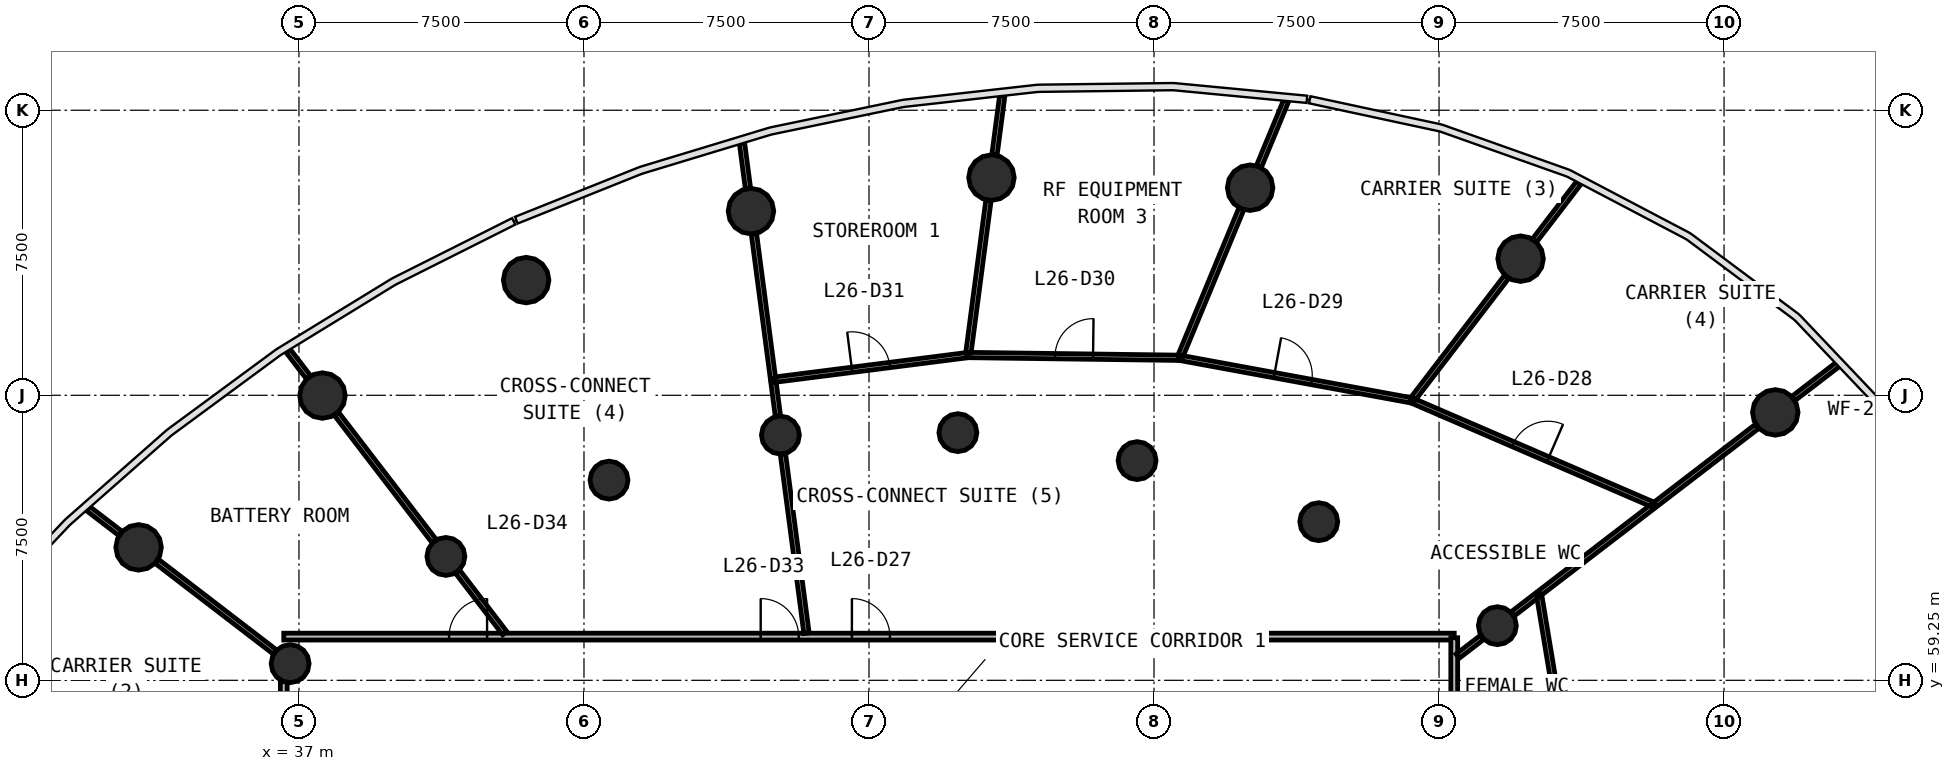
"""IFC4 building model, lengths in metres.
Left out: names, types, materials, properties, quantities, classifications, styles, units other than length and angle.
Written with IfcOpenShell. Run it as: python <this file> out.ifc"""

import sys

from ifc_helpers import new_model, si_unit, direction, frame, frame_2d, origin, origin_2d, place, context, subcontext, project, spatial, rectangle, circle, extrude, source, transform, mapped, element, fill, save


model = new_model("IFC4")
c1 = context("Model", 3, precision=1e-05, world=origin(), true_north=direction((0.0, 1.0)))
c2 = subcontext(c1, "Body", "Model", "MODEL_VIEW")
j1 = project(units=[si_unit("LENGTHUNIT", "METRE"), si_unit("PLANEANGLEUNIT", "RADIAN")], contexts=[c1])
p1 = place(None, origin())
s1 = spatial("IfcSite", under=j1, at=p1, CompositionType="ELEMENT")
p2 = place(p1, origin())
s2 = spatial("IfcBuilding", under=s1, at=p2, CompositionType="ELEMENT")
p3 = place(p2, frame((0.0, 0.0, 112.6)))
s3 = spatial("IfcBuildingStorey", under=s2, at=p3, CompositionType="ELEMENT", Elevation=112.6)
m1 = source(origin(), c2, "Body", "SweptSolid", [
    extrude(circle(Radius=0.6, at=origin_2d()), origin(), (0.0, 0.0, 1.0), 4.1),
])
for number, where, z_axis, x_axis in (
    (1, (75.848, 66.299, 0.0), (0.0, 0.0, 1.0), (1.0, 0.0, 0.0)),
    (2, (69.146, 70.345, 0.0), (0.0, 0.0, 1.0), (1.0, 0.0, 0.0)),
    (3, (62.029, 72.212, 0.0), (0.0, 0.0, 1.0), (1.0, 0.0, 0.0)),
    (4, (55.222, 72.477, 0.0), (0.0, 0.0, 1.0), (1.0, 0.0, 0.0)),
    (5, (48.894, 71.595, 0.0), (0.0, 0.0, 1.0), (1.0, 0.0, 0.0)),
    (6, (42.978, 69.781, 0.0), (0.0, 0.0, 1.0), (1.0, 0.0, 0.0)),
    (7, (37.618, 66.743, 0.0), (0.0, 0.0, 1.0), (1.0, 0.0, 0.0)),
    (8, (32.78, 62.748, 0.0), (0.0, 0.0, 1.0), (1.0, 0.0, 0.0)),
):
    element("IfcColumn", number, at=place(p3, frame(where, z_axis=z_axis, x_axis=x_axis)), inside=s3, PredefinedType="COLUMN", context=c2, shape_type="MappedRepresentation", body=[
        mapped(m1, transform((0.0, 0.0, 0.0), scale=1.0)),
    ])
m2 = source(origin(), c2, "Body", "SweptSolid", [
    extrude(circle(Radius=0.5, at=origin_2d()), origin(), (0.0, 0.0, 1.0), 4.1),
])
for number, where, z_axis, x_axis in (
    (9, (68.535, 60.688, 0.0), (0.0, 0.0, 1.0), (1.0, 0.0, 0.0)),
    (10, (63.835, 63.424, 0.0), (0.0, 0.0, 1.0), (1.0, 0.0, 0.0)),
    (11, (59.055, 65.031, 0.0), (0.0, 0.0, 1.0), (1.0, 0.0, 0.0)),
    (12, (54.339, 65.767, 0.0), (0.0, 0.0, 1.0), (1.0, 0.0, 0.0)),
    (13, (49.669, 65.703, 0.0), (0.0, 0.0, 1.0), (1.0, 0.0, 0.0)),
    (14, (45.158, 64.518, 0.0), (0.0, 0.0, 1.0), (1.0, 0.0, 0.0)),
    (15, (40.866, 62.51, 0.0), (0.0, 0.0, 1.0), (1.0, 0.0, 0.0)),
    (16, (36.768, 59.688, 0.0), (0.0, 0.0, 1.0), (1.0, 0.0, 0.0)),
):
    element("IfcColumn", number, at=place(p3, frame(where, z_axis=z_axis, x_axis=x_axis)), inside=s3, PredefinedType="COLUMN", context=c2, shape_type="MappedRepresentation", body=[
        mapped(m2, transform((0.0, 0.0, 0.0), scale=1.0)),
    ])
p4 = place(p3, frame((36.6, 60.4, 0.0), z_axis=(0.0, 0.0, 1.0), x_axis=(1.0, 0.0, 0.0)))
e17 = element("IfcWall", 17, at=p4, inside=s3, PredefinedType="PARTITIONING", context=c2, shape_type="SweptSolid", body=[
    extrude(rectangle(XDim=30.8, YDim=0.18, at=frame_2d((15.4, 0.0))), origin(), (0.0, 0.0, 1.0), 2.9),
])
p5 = place(p4, frame((14.95, 0.0, 0.0)))
e18 = element("IfcOpeningElement", 18, at=p5, cuts=e17, PredefinedType="OPENING", context=c2, shape_type="SweptSolid", body=[
    extrude(rectangle(XDim=1.0, YDim=2.1, at=frame_2d((0.5, 1.05))), frame((0.0, 0.1, 0.0), z_axis=(0.0, -1.0, 0.0), x_axis=(1.0, 0.0, 0.0)), (0.0, 0.0, 1.0), 0.2),
])
p6 = place(p4, frame((12.55, 0.0, 0.0)))
e19 = element("IfcOpeningElement", 19, at=p6, cuts=e17, PredefinedType="OPENING", context=c2, shape_type="SweptSolid", body=[
    extrude(rectangle(XDim=1.0, YDim=2.1, at=frame_2d((0.5, 1.05))), frame((0.0, 0.1, 0.0), z_axis=(0.0, -1.0, 0.0), x_axis=(1.0, 0.0, 0.0)), (0.0, 0.0, 1.0), 0.2),
])
p7 = place(p4, frame((4.35, 0.0, 0.0)))
e20 = element("IfcOpeningElement", 20, at=p7, cuts=e17, PredefinedType="OPENING", context=c2, shape_type="SweptSolid", body=[
    extrude(rectangle(XDim=1.0, YDim=2.1, at=frame_2d((0.5, 1.05))), frame((0.0, 0.1, 0.0), z_axis=(0.0, -1.0, 0.0), x_axis=(1.0, 0.0, 0.0)), (0.0, 0.0, 1.0), 0.2),
])
p8 = place(p3, frame((67.4, 60.37, 0.0), z_axis=(0.0, 0.0, 1.0), x_axis=(0.0, -1.0, 0.0)))
e21 = element("IfcWall", 21, at=p8, inside=s3, PredefinedType="PARTITIONING", context=c2, shape_type="SweptSolid", body=[
    extrude(rectangle(XDim=23.583, YDim=0.18, at=frame_2d((11.791, 0.0))), origin(), (0.0, 0.0, 1.0), 2.9),
])
p9 = place(p8, frame((9.232, 0.0, 0.0)))
e22 = element("IfcOpeningElement", 22, at=p9, cuts=e21, PredefinedType="OPENING", context=c2, shape_type="SweptSolid", body=[
    extrude(rectangle(XDim=0.9, YDim=2.1, at=frame_2d((0.45, 1.05))), frame((0.0, 0.1, 0.0), z_axis=(0.0, -1.0, 0.0), x_axis=(1.0, 0.0, 0.0)), (0.0, 0.0, 1.0), 0.2),
])
p10 = place(p8, frame((6.232, 0.0, 0.0)))
e23 = element("IfcOpeningElement", 23, at=p10, cuts=e21, PredefinedType="OPENING", context=c2, shape_type="SweptSolid", body=[
    extrude(rectangle(XDim=0.9, YDim=2.1, at=frame_2d((0.45, 1.05))), frame((0.0, 0.1, 0.0), z_axis=(0.0, -1.0, 0.0), x_axis=(1.0, 0.0, 0.0)), (0.0, 0.0, 1.0), 0.2),
])
p11 = place(p8, frame((3.032, 0.0, 0.0)))
e24 = element("IfcOpeningElement", 24, at=p11, cuts=e21, PredefinedType="OPENING", context=c2, shape_type="SweptSolid", body=[
    extrude(rectangle(XDim=0.9, YDim=2.1, at=frame_2d((0.45, 1.05))), frame((0.0, 0.1, 0.0), z_axis=(0.0, -1.0, 0.0), x_axis=(1.0, 0.0, 0.0)), (0.0, 0.0, 1.0), 0.2),
])
p12 = place(p8, frame((11.333, 0.0, 0.0)))
e25 = element("IfcOpeningElement", 25, at=p12, cuts=e21, PredefinedType="OPENING", context=c2, shape_type="SweptSolid", body=[
    extrude(rectangle(XDim=1.0, YDim=2.1, at=frame_2d((0.5, 1.05))), frame((0.0, 0.1, 0.0), z_axis=(0.0, -1.0, 0.0), x_axis=(1.0, 0.0, 0.0)), (0.0, 0.0, 1.0), 0.2),
])
p13 = place(p3, frame((36.6, 35.63, 0.0), z_axis=(0.0, 0.0, 1.0), x_axis=(0.0, 1.0, 0.0)))
e26 = element("IfcWall", 26, at=p13, inside=s3, PredefinedType="PARTITIONING", context=c2, shape_type="SweptSolid", body=[
    extrude(rectangle(XDim=23.583, YDim=0.18, at=frame_2d((11.791, 0.0))), origin(), (0.0, 0.0, 1.0), 2.9),
])
p14 = place(p13, frame((19.133, 0.0, 0.0)))
e27 = element("IfcOpeningElement", 27, at=p14, cuts=e26, PredefinedType="OPENING", context=c2, shape_type="SweptSolid", body=[
    extrude(rectangle(XDim=1.0, YDim=2.1, at=frame_2d((0.5, 1.05))), frame((0.0, 0.1, 0.0), z_axis=(0.0, -1.0, 0.0), x_axis=(1.0, 0.0, 0.0)), (0.0, 0.0, 1.0), 0.2),
])
p15 = place(p13, frame((11.333, 0.0, 0.0)))
e28 = element("IfcOpeningElement", 28, at=p15, cuts=e26, PredefinedType="OPENING", context=c2, shape_type="SweptSolid", body=[
    extrude(rectangle(XDim=1.0, YDim=2.1, at=frame_2d((0.5, 1.05))), frame((0.0, 0.1, 0.0), z_axis=(0.0, -1.0, 0.0), x_axis=(1.0, 0.0, 0.0)), (0.0, 0.0, 1.0), 0.2),
])
p16 = place(p3, frame((66.283, 66.614, 0.0), z_axis=(0.0, 0.0, 1.0), x_axis=(0.918121300146, -0.396299480467, 0.0)))
e29 = element("IfcWall", 29, at=p16, inside=s3, PredefinedType="PARTITIONING", context=c2, shape_type="SweptSolid", body=[
    extrude(rectangle(XDim=6.953, YDim=0.14, at=frame_2d((3.477, 0.0))), origin(), (0.0, 0.0, 1.0), 2.9),
])
p17 = place(p16, frame((2.903, 0.0, 0.0)))
e30 = element("IfcOpeningElement", 30, at=p17, cuts=e29, PredefinedType="OPENING", context=c2, shape_type="SweptSolid", body=[
    extrude(rectangle(XDim=1.0, YDim=2.1, at=frame_2d((0.5, 1.05))), frame((0.0, 0.08, 0.0), z_axis=(0.0, -1.0, 0.0), x_axis=(1.0, 0.0, 0.0)), (0.0, 0.0, 1.0), 0.16),
])
p18 = place(p3, frame((60.175, 67.736, 0.0), z_axis=(0.0, 0.0, 1.0), x_axis=(0.983532551925, -0.180731069007, 0.0)))
e31 = element("IfcWall", 31, at=p18, inside=s3, PredefinedType="PARTITIONING", context=c2, shape_type="SweptSolid", body=[
    extrude(rectangle(XDim=6.18, YDim=0.14, at=frame_2d((3.09, 0.0))), origin(), (0.0, 0.0, 1.0), 2.9),
])
p19 = place(p18, frame((2.53, 0.0, 0.0)))
e32 = element("IfcOpeningElement", 32, at=p19, cuts=e31, PredefinedType="OPENING", context=c2, shape_type="SweptSolid", body=[
    extrude(rectangle(XDim=1.0, YDim=2.1, at=frame_2d((0.5, 1.05))), frame((0.0, 0.08, 0.0), z_axis=(0.0, -1.0, 0.0), x_axis=(1.0, 0.0, 0.0)), (0.0, 0.0, 1.0), 0.16),
])
p20 = place(p3, frame((70.595, 55.702, 0.0), z_axis=(0.0, 0.0, 1.0), x_axis=(-0.163882608994, 0.986479847979, 0.0)))
e33 = element("IfcWall", 33, at=p20, inside=s3, PredefinedType="PARTITIONING", context=c2, shape_type="SweptSolid", body=[
    extrude(rectangle(XDim=5.904, YDim=0.14, at=frame_2d((2.952, 0.0))), origin(), (0.0, 0.0, 1.0), 2.9),
])
p21 = place(p3, frame((54.608, 67.809, 0.0), z_axis=(0.0, 0.0, 1.0), x_axis=(0.999914844667, -0.01305003501, 0.0)))
e34 = element("IfcWall", 34, at=p21, inside=s3, PredefinedType="PARTITIONING", context=c2, shape_type="SweptSolid", body=[
    extrude(rectangle(XDim=5.538, YDim=0.14, at=frame_2d((2.769, 0.0))), origin(), (0.0, 0.0, 1.0), 2.9),
])
p22 = place(p21, frame((2.288, 0.0, 0.0)))
e35 = element("IfcOpeningElement", 35, at=p22, cuts=e34, PredefinedType="OPENING", context=c2, shape_type="SweptSolid", body=[
    extrude(rectangle(XDim=1.0, YDim=2.1, at=frame_2d((0.5, 1.05))), frame((0.0, 0.08, 0.0), z_axis=(0.0, -1.0, 0.0), x_axis=(1.0, 0.0, 0.0)), (0.0, 0.0, 1.0), 0.16),
])
p23 = place(p3, frame((49.478, 67.156, 0.0), z_axis=(0.0, 0.0, 1.0), x_axis=(0.991978436008, 0.126407209031, 0.0)))
e36 = element("IfcWall", 36, at=p23, inside=s3, PredefinedType="PARTITIONING", context=c2, shape_type="SweptSolid", body=[
    extrude(rectangle(XDim=5.141, YDim=0.14, at=frame_2d((2.571, 0.0))), origin(), (0.0, 0.0, 1.0), 2.9),
])
p24 = place(p23, frame((2.091, 0.0, 0.0)))
e37 = element("IfcOpeningElement", 37, at=p24, cuts=e36, PredefinedType="OPENING", context=c2, shape_type="SweptSolid", body=[
    extrude(rectangle(XDim=1.0, YDim=2.1, at=frame_2d((0.5, 1.05))), frame((0.0, 0.08, 0.0), z_axis=(0.0, -1.0, 0.0), x_axis=(1.0, 0.0, 0.0)), (0.0, 0.0, 1.0), 0.16),
])
p25 = place(p3, frame((50.356, 60.49, 0.0), z_axis=(0.0, 0.0, 1.0), x_axis=(-0.130548834981, 0.991441880135, 0.0)))
e38 = element("IfcWall", 38, at=p25, inside=s3, PredefinedType="PARTITIONING", context=c2, shape_type="SweptSolid", body=[
    extrude(rectangle(XDim=4.754, YDim=0.14, at=frame_2d((2.377, 0.0))), origin(), (0.0, 0.0, 1.0), 2.9),
])
p26 = place(p3, frame((60.202, 67.802, 0.0), z_axis=(0.0, 0.0, 1.0), x_axis=(0.38271390309, 0.923866910535, 0.0)))
e39 = element("IfcWall", 39, at=p26, inside=s3, PredefinedType="PARTITIONING", context=c2, shape_type="SweptSolid", body=[
    extrude(rectangle(XDim=4.168, YDim=0.14, at=frame_2d((2.084, 0.0))), origin(), (0.0, 0.0, 1.0), 2.9),
])
p27 = place(p3, frame((40.559, 62.91, 0.0), z_axis=(0.0, 0.0, 1.0), x_axis=(-0.608789197027, 0.793332032369, 0.0)))
e40 = element("IfcWall", 40, at=p27, inside=s3, PredefinedType="PARTITIONING", context=c2, shape_type="SweptSolid", body=[
    extrude(rectangle(XDim=4.227, YDim=0.14, at=frame_2d((2.113, 0.0))), origin(), (0.0, 0.0, 1.0), 2.9),
])
p28 = place(p3, frame((54.617, 67.879, 0.0), z_axis=(0.0, 0.0, 1.0), x_axis=(0.130506184728, 0.991447495205, 0.0)))
e41 = element("IfcWall", 41, at=p28, inside=s3, PredefinedType="PARTITIONING", context=c2, shape_type="SweptSolid", body=[
    extrude(rectangle(XDim=4.033, YDim=0.14, at=frame_2d((2.017, 0.0))), origin(), (0.0, 0.0, 1.0), 2.9),
])
p29 = place(p3, frame((66.327, 66.671, 0.0), z_axis=(0.0, 0.0, 1.0), x_axis=(0.608734471968, 0.793374024428, 0.0)))
e42 = element("IfcWall", 42, at=p29, inside=s3, PredefinedType="PARTITIONING", context=c2, shape_type="SweptSolid", body=[
    extrude(rectangle(XDim=4.026, YDim=0.14, at=frame_2d((2.013, 0.0))), origin(), (0.0, 0.0, 1.0), 2.9),
])
p30 = place(p3, frame((36.367, 59.995, 0.0), z_axis=(0.0, 0.0, 1.0), x_axis=(-0.793362528146, 0.608749454977, 0.0)))
e43 = element("IfcWall", 43, at=p30, inside=s3, PredefinedType="PARTITIONING", context=c2, shape_type="SweptSolid", body=[
    extrude(rectangle(XDim=3.917, YDim=0.14, at=frame_2d((1.958, 0.0))), origin(), (0.0, 0.0, 1.0), 2.9),
])
p31 = place(p3, frame((49.474, 67.185, 0.0), z_axis=(0.0, 0.0, 1.0), x_axis=(-0.130528450204, 0.991444564102, 0.0)))
e44 = element("IfcWall", 44, at=p31, inside=s3, PredefinedType="PARTITIONING", context=c2, shape_type="SweptSolid", body=[
    extrude(rectangle(XDim=3.844, YDim=0.14, at=frame_2d((1.922, 0.0))), origin(), (0.0, 0.0, 1.0), 2.9),
])
p32 = place(p3, frame((69.652, 61.545, 0.0), z_axis=(0.0, 0.0, 1.0), x_axis=(0.793377127062, 0.608730428232, 0.0)))
e45 = element("IfcWall", 45, at=p32, inside=s3, PredefinedType="PARTITIONING", context=c2, shape_type="SweptSolid", body=[
    extrude(rectangle(XDim=3.721, YDim=0.14, at=frame_2d((1.86, 0.0))), origin(), (0.0, 0.0, 1.0), 2.9),
])
p33 = place(p3, frame((72.691, 63.877, 0.0), z_axis=(0.0, 0.0, 1.0), x_axis=(0.793381625317, 0.608724565472, 0.0)))
e46 = element("IfcWall", 46, at=p33, inside=s3, PredefinedType="PARTITIONING", context=c2, shape_type="SweptSolid", body=[
    extrude(rectangle(XDim=3.375, YDim=0.14, at=frame_2d((1.688, 0.0))), origin(), (0.0, 0.0, 1.0), 2.9),
])
p34 = place(p3, frame((42.416, 60.49, 0.0), z_axis=(0.0, 0.0, 1.0), x_axis=(-0.608727763541, 0.793379171578, 0.0)))
e47 = element("IfcWall", 47, at=p34, inside=s3, PredefinedType="PARTITIONING", context=c2, shape_type="SweptSolid", body=[
    extrude(rectangle(XDim=2.042, YDim=0.14, at=frame_2d((1.021, 0.0))), origin(), (0.0, 0.0, 1.0), 2.9),
])
p35 = place(p3, frame((69.514, 70.824, 0.0), z_axis=(0.0, 0.0, 1.0), x_axis=(0.608775965964, 0.793342185482, 0.0)))
e48 = element("IfcWall", 48, at=p35, inside=s3, PredefinedType="PARTITIONING", context=c2, shape_type="SweptSolid", body=[
    extrude(rectangle(XDim=1.919, YDim=0.14, at=frame_2d((0.96, 0.0))), origin(), (0.0, 0.0, 1.0), 2.9),
])
p36 = place(p3, frame((62.26, 72.771, 0.0), z_axis=(0.0, 0.0, 1.0), x_axis=(0.3827117772, 0.923867791187, 0.0)))
e49 = element("IfcWall", 49, at=p36, inside=s3, PredefinedType="PARTITIONING", context=c2, shape_type="SweptSolid", body=[
    extrude(rectangle(XDim=1.877, YDim=0.14, at=frame_2d((0.938, 0.0))), origin(), (0.0, 0.0, 1.0), 2.9),
])
p37 = place(p3, frame((55.301, 73.076, 0.0), z_axis=(0.0, 0.0, 1.0), x_axis=(0.130526351537, 0.991444840399, 0.0)))
e50 = element("IfcWall", 50, at=p37, inside=s3, PredefinedType="PARTITIONING", context=c2, shape_type="SweptSolid", body=[
    extrude(rectangle(XDim=1.582, YDim=0.14, at=frame_2d((0.791, 0.0))), origin(), (0.0, 0.0, 1.0), 2.9),
])
p38 = place(p3, frame((76.328, 66.667, 0.0), z_axis=(0.0, 0.0, 1.0), x_axis=(0.793320214774, 0.608804596592, 0.0)))
e51 = element("IfcWall", 51, at=p38, inside=s3, PredefinedType="PARTITIONING", context=c2, shape_type="SweptSolid", body=[
    extrude(rectangle(XDim=1.511, YDim=0.14, at=frame_2d((0.755, 0.0))), origin(), (0.0, 0.0, 1.0), 2.9),
])
p39 = place(p3, frame((48.815, 72.195, 0.0), z_axis=(0.0, 0.0, 1.0), x_axis=(-0.130396807745, 0.991461886574, 0.0)))
e52 = element("IfcWall", 52, at=p39, inside=s3, PredefinedType="PARTITIONING", context=c2, shape_type="SweptSolid", body=[
    extrude(rectangle(XDim=1.204, YDim=0.14, at=frame_2d((0.602, 0.0))), origin(), (0.0, 0.0, 1.0), 2.9),
])
p40 = place(p3, frame((32.301, 63.116, 0.0), z_axis=(0.0, 0.0, 1.0), x_axis=(-0.793283750572, 0.608852109365, 0.0)))
e53 = element("IfcWall", 53, at=p40, inside=s3, PredefinedType="PARTITIONING", context=c2, shape_type="SweptSolid", body=[
    extrude(rectangle(XDim=1.072, YDim=0.14, at=frame_2d((0.536, 0.0))), origin(), (0.0, 0.0, 1.0), 2.9),
])
p41 = place(p3, frame((49.604, 66.203, 0.0), z_axis=(0.0, 0.0, 1.0), x_axis=(-0.13051125281, 0.99144682807, 0.0)))
e54 = element("IfcWall", 54, at=p41, inside=s3, PredefinedType="PARTITIONING", context=c2, shape_type="SweptSolid", body=[
    extrude(rectangle(XDim=0.89, YDim=0.14, at=frame_2d((0.445, 0.0))), origin(), (0.0, 0.0, 1.0), 2.9),
])
p42 = place(p3, frame((67.49, 59.886, 0.0), z_axis=(0.0, 0.0, 1.0), x_axis=(0.793316076519, 0.608809989025, 0.0)))
e55 = element("IfcWall", 55, at=p42, inside=s3, PredefinedType="PARTITIONING", context=c2, shape_type="SweptSolid", body=[
    extrude(rectangle(XDim=0.812, YDim=0.14, at=frame_2d((0.406, 0.0))), origin(), (0.0, 0.0, 1.0), 2.9),
])
p43 = place(p3, frame((37.25, 67.222, 0.0), z_axis=(0.0, 0.0, 1.0), x_axis=(-0.608583077593, 0.7934901623, 0.0)))
e56 = element("IfcWall", 56, at=p43, inside=s3, PredefinedType="PARTITIONING", context=c2, shape_type="SweptSolid", body=[
    extrude(rectangle(XDim=0.879, YDim=0.14, at=frame_2d((0.44, 0.0))), origin(), (0.0, 0.0, 1.0), 2.9),
])
p44 = place(p3, frame((68.935, 60.995, 0.0), z_axis=(0.0, 0.0, 1.0), x_axis=(0.79330932609, 0.608818785139, 0.0)))
e57 = element("IfcWall", 57, at=p44, inside=s3, PredefinedType="PARTITIONING", context=c2, shape_type="SweptSolid", body=[
    extrude(rectangle(XDim=0.794, YDim=0.14, at=frame_2d((0.397, 0.0))), origin(), (0.0, 0.0, 1.0), 2.9),
])
m3 = source(origin(), c2, "Body", "SweptSolid", [
    extrude(rectangle(XDim=1.0, YDim=2.1, at=frame_2d((0.5, 1.05))), frame((0.0, 0.025, 0.0), z_axis=(0.0, -1.0, 0.0), x_axis=(1.0, 0.0, 0.0)), (0.0, 0.0, 1.0), 0.05),
])
p45 = place(p5, origin())
e58 = element("IfcDoor", 58, at=p45, inside=s3, OperationType="SINGLE_SWING_LEFT", PredefinedType="DOOR", context=c2, shape_type="MappedRepresentation", body=[
    mapped(m3, transform((0.0, 0.0, 0.0), scale=1.0)),
])
fill(e18, e58)
p46 = place(p17, origin())
e59 = element("IfcDoor", 59, at=p46, inside=s3, OperationType="SINGLE_SWING_RIGHT", PredefinedType="DOOR", context=c2, shape_type="MappedRepresentation", body=[
    mapped(m3, transform((0.0, 0.0, 0.0), scale=1.0)),
])
fill(e30, e59)
p47 = place(p19, origin())
e60 = element("IfcDoor", 60, at=p47, inside=s3, OperationType="SINGLE_SWING_LEFT", PredefinedType="DOOR", context=c2, shape_type="MappedRepresentation", body=[
    mapped(m3, transform((0.0, 0.0, 0.0), scale=1.0)),
])
fill(e32, e60)
p48 = place(p22, origin())
e61 = element("IfcDoor", 61, at=p48, inside=s3, OperationType="SINGLE_SWING_RIGHT", PredefinedType="DOOR", context=c2, shape_type="MappedRepresentation", body=[
    mapped(m3, transform((0.0, 0.0, 0.0), scale=1.0)),
])
fill(e35, e61)
p49 = place(p24, origin())
e62 = element("IfcDoor", 62, at=p49, inside=s3, OperationType="SINGLE_SWING_LEFT", PredefinedType="DOOR", context=c2, shape_type="MappedRepresentation", body=[
    mapped(m3, transform((0.0, 0.0, 0.0), scale=1.0)),
])
fill(e37, e62)
p50 = place(p6, origin())
e63 = element("IfcDoor", 63, at=p50, inside=s3, OperationType="SINGLE_SWING_LEFT", PredefinedType="DOOR", context=c2, shape_type="MappedRepresentation", body=[
    mapped(m3, transform((0.0, 0.0, 0.0), scale=1.0)),
])
fill(e19, e63)
p51 = place(p7, origin())
e64 = element("IfcDoor", 64, at=p51, inside=s3, OperationType="SINGLE_SWING_RIGHT", PredefinedType="DOOR", context=c2, shape_type="MappedRepresentation", body=[
    mapped(m3, transform((0.0, 0.0, 0.0), scale=1.0)),
])
fill(e20, e64)
save(model, sys.argv[1])
